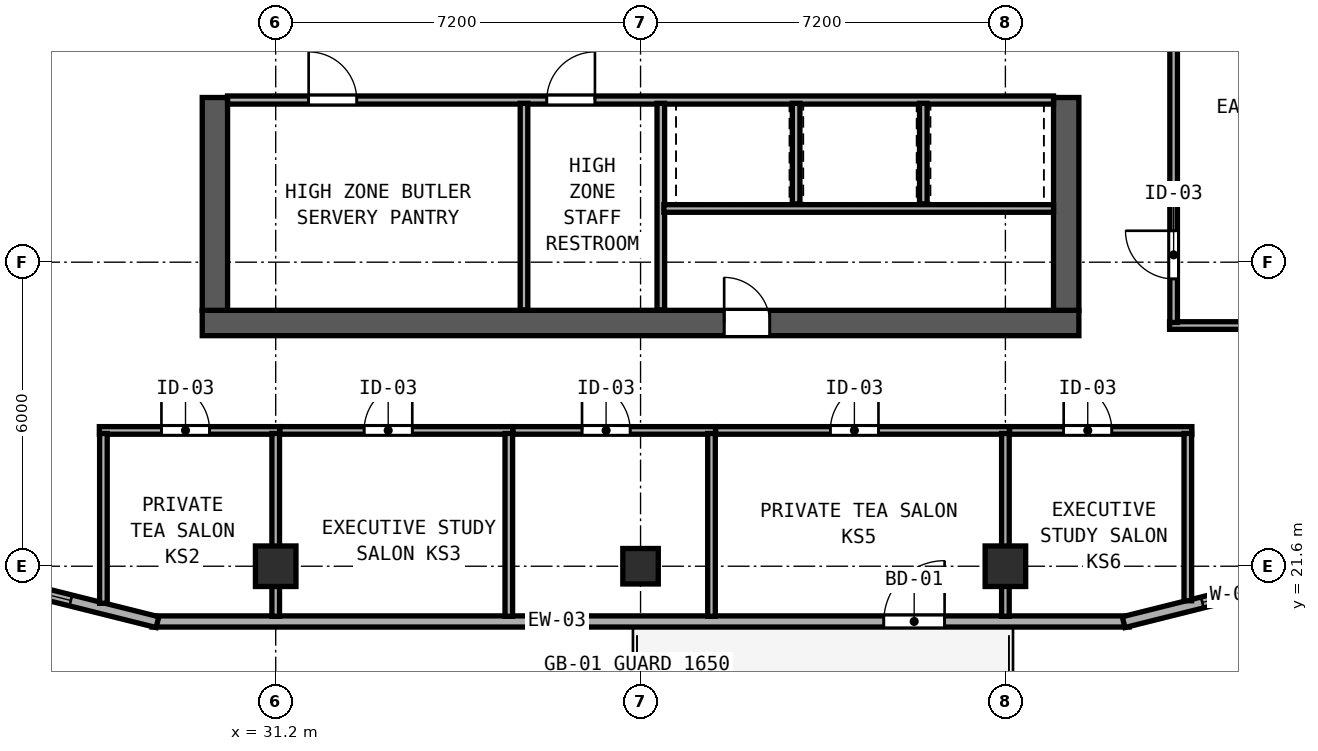
"""IFC4 building model, lengths in metres.
Left out: names, types, materials, properties, quantities, classifications, styles, units other than length and angle.
Written with IfcOpenShell. Run it as: python <this file> out.ifc"""

import sys

from ifc_helpers import new_model, si_unit, direction, frame, frame_2d, origin, origin_2d, place, context, subcontext, project, spatial, rectangle, hollow_rectangle, extrude, element, fill, save


model = new_model("IFC4")
c1 = context("Model", 3, precision=1e-05, world=origin(), true_north=direction((0.0, 1.0)))
c2 = subcontext(c1, "Body", "Model", "MODEL_VIEW")
j1 = project(units=[si_unit("LENGTHUNIT", "METRE"), si_unit("PLANEANGLEUNIT", "RADIAN")], contexts=[c1])
p1 = place(None, origin())
s1 = spatial("IfcSite", under=j1, at=p1, CompositionType="ELEMENT")
p2 = place(p1, origin())
s2 = spatial("IfcBuilding", under=s1, at=p2, CompositionType="ELEMENT")
p3 = place(p2, frame((0.0, 0.0, 258.3)))
s3 = spatial("IfcBuildingStorey", under=s2, at=p3, CompositionType="ELEMENT", Elevation=258.3)
p4 = place(p3, frame((29.75, 26.4, 0.0), z_axis=(0.0, 0.0, 1.0), x_axis=(1.0, 0.0, 0.0)))
e1 = element("IfcWall", 1, at=p4, inside=s3, PredefinedType="SHEAR", context=c2, shape_type="SweptSolid", body=[
    extrude(rectangle(XDim=17.3, YDim=0.5, at=frame_2d((8.65, 0.0))), origin(), (0.0, 0.0, 1.0), 3.67),
])
p5 = place(p4, frame((11.2, 0.0, 0.0), z_axis=(0.0, 0.0, 1.0), x_axis=(-1.0, 0.0, 0.0)))
e2 = element("IfcOpeningElement", 2, at=p5, cuts=e1, PredefinedType="OPENING", context=c2, shape_type="SweptSolid", body=[
    extrude(rectangle(XDim=0.9, YDim=2.1, at=frame_2d((0.45, 1.05))), frame((0.0, 0.26, 0.0), z_axis=(0.0, -1.0, 0.0), x_axis=(1.0, 0.0, 0.0)), (0.0, 0.0, 1.0), 0.52),
])
for number, where, z_axis, x_axis in (
    (3, (30.0, 26.65, 0.0), (0.0, 0.0, 1.0), (0.0, 1.0, 0.0)),
    (4, (46.8, 26.65, 0.0), (0.0, 0.0, 1.0), (0.0, 1.0, 0.0)),
):
    element("IfcWall", number, at=place(p3, frame(where, z_axis=z_axis, x_axis=x_axis)), inside=s3, PredefinedType="SHEAR", context=c2, shape_type="SweptSolid", body=[
        extrude(rectangle(XDim=4.2, YDim=0.5, at=frame_2d((2.1, 0.0))), origin(), (0.0, 0.0, 1.0), 3.67),
    ])
for number, where, z_axis, x_axis in (
    (5, (31.2, 21.6, 0.0), (0.0, 0.0, 1.0), (1.0, 0.0, 0.0)),
    (6, (45.6, 21.6, 0.0), (0.0, 0.0, 1.0), (1.0, 0.0, 0.0)),
):
    element("IfcColumn", number, at=place(p3, frame(where, z_axis=z_axis, x_axis=x_axis)), inside=s3, PredefinedType="COLUMN", context=c2, shape_type="SweptSolid", body=[
        extrude(hollow_rectangle(XDim=0.8, YDim=0.8, WallThickness=0.03, at=origin_2d()), origin(), (0.0, 0.0, 1.0), 3.85),
    ])
p6 = place(p3, frame((38.4, 21.6, 0.0), z_axis=(0.0, 0.0, 1.0), x_axis=(1.0, 0.0, 0.0)))
e7 = element("IfcColumn", 7, at=p6, inside=s3, PredefinedType="COLUMN", context=c2, shape_type="SweptSolid", body=[
    extrude(hollow_rectangle(XDim=0.7, YDim=0.7, WallThickness=0.026, at=origin_2d()), origin(), (0.0, 0.0, 1.0), 3.85),
])
p7 = place(p3, frame((28.759, 20.51, 0.0), z_axis=(0.0, 0.0, 1.0), x_axis=(1.0, 0.0, 0.0)))
e8 = element("IfcWall", 8, at=p7, inside=s3, PredefinedType="SOLIDWALL", context=c2, shape_type="SweptSolid", body=[
    extrude(rectangle(XDim=19.283, YDim=0.22, at=frame_2d((9.642, 0.0))), origin(), (0.0, 0.0, 1.0), 3.67),
])
p8 = place(p7, frame((15.641, 0.0, 0.0), z_axis=(0.0, 0.0, 1.0), x_axis=(-1.0, 0.0, 0.0)))
e9 = element("IfcOpeningElement", 9, at=p8, cuts=e8, PredefinedType="OPENING", context=c2, shape_type="SweptSolid", body=[
    extrude(rectangle(XDim=1.2, YDim=2.15, at=frame_2d((0.6, 1.075))), frame((0.0, 0.12, 0.0), z_axis=(0.0, -1.0, 0.0), x_axis=(1.0, 0.0, 0.0)), (0.0, 0.0, 1.0), 0.24),
])
p9 = place(p3, frame((47.933, 20.497, 0.0), z_axis=(0.0, 0.0, 1.0), x_axis=(0.970133159038, 0.242572986408, 0.0)))
e10 = element("IfcWall", 10, at=p9, inside=s3, PredefinedType="SOLIDWALL", context=c2, shape_type="SweptSolid", body=[
    extrude(rectangle(XDim=4.613, YDim=0.22, at=frame_2d((2.306, 0.0))), origin(), (0.0, 0.0, 1.0), 3.315),
])
p10 = place(p9, frame((1.6, 0.0, 0.85)))
e11 = element("IfcOpeningElement", 11, at=p10, cuts=e10, PredefinedType="OPENING", context=c2, shape_type="SweptSolid", body=[
    extrude(rectangle(XDim=1.25, YDim=1.95, at=frame_2d((0.625, 0.975))), frame((0.0, 0.12, 0.0), z_axis=(0.0, -1.0, 0.0), x_axis=(1.0, 0.0, 0.0)), (0.0, 0.0, 1.0), 0.24),
])
p11 = place(p3, frame((24.392, 21.615, 0.0), z_axis=(0.0, 0.0, 1.0), x_axis=(0.970133159038, -0.242572986408, 0.0)))
e12 = element("IfcWall", 12, at=p11, inside=s3, PredefinedType="SOLIDWALL", context=c2, shape_type="SweptSolid", body=[
    extrude(rectangle(XDim=4.613, YDim=0.22, at=frame_2d((2.306, 0.0))), origin(), (0.0, 0.0, 1.0), 3.315),
])
p12 = place(p11, frame((1.6, 0.0, 0.85)))
e13 = element("IfcOpeningElement", 13, at=p12, cuts=e12, PredefinedType="OPENING", context=c2, shape_type="SweptSolid", body=[
    extrude(rectangle(XDim=1.25, YDim=1.95, at=frame_2d((0.625, 0.975))), frame((0.0, 0.12, 0.0), z_axis=(0.0, -1.0, 0.0), x_axis=(1.0, 0.0, 0.0)), (0.0, 0.0, 1.0), 0.24),
])
p13 = place(p3, frame((30.25, 30.8, 0.0), z_axis=(0.0, 0.0, 1.0), x_axis=(1.0, 0.0, 0.0)))
e14 = element("IfcWall", 14, at=p13, inside=s3, PredefinedType="SOLIDWALL", context=c2, shape_type="SweptSolid", body=[
    extrude(rectangle(XDim=16.3, YDim=0.16, at=frame_2d((8.15, 0.0))), origin(), (0.0, 0.0, 1.0), 3.67),
])
p14 = place(p13, frame((1.6, 0.0, 0.0)))
e15 = element("IfcOpeningElement", 15, at=p14, cuts=e14, PredefinedType="OPENING", context=c2, shape_type="SweptSolid", body=[
    extrude(rectangle(XDim=0.95, YDim=2.12, at=frame_2d((0.475, 1.06))), frame((0.0, 0.09, 0.0), z_axis=(0.0, -1.0, 0.0), x_axis=(1.0, 0.0, 0.0)), (0.0, 0.0, 1.0), 0.18),
])
p15 = place(p13, frame((6.3, 0.0, 0.0)))
e16 = element("IfcOpeningElement", 16, at=p15, cuts=e14, PredefinedType="OPENING", context=c2, shape_type="SweptSolid", body=[
    extrude(rectangle(XDim=0.95, YDim=2.12, at=frame_2d((0.475, 1.06))), frame((0.0, 0.09, 0.0), z_axis=(0.0, -1.0, 0.0), x_axis=(1.0, 0.0, 0.0)), (0.0, 0.0, 1.0), 0.18),
])
p16 = place(p3, frame((38.8, 26.66, 0.0), z_axis=(0.0, 0.0, 1.0), x_axis=(0.0, 1.0, 0.0)))
e17 = element("IfcWall", 17, at=p16, inside=s3, PredefinedType="SOLIDWALL", context=c2, shape_type="SweptSolid", body=[
    extrude(rectangle(XDim=4.075, YDim=0.15, at=frame_2d((2.038, 0.0))), origin(), (0.0, 0.0, 1.0), 3.67),
])
p17 = place(p3, frame((36.1, 26.66, 0.0), z_axis=(0.0, 0.0, 1.0), x_axis=(0.0, 1.0, 0.0)))
e18 = element("IfcWall", 18, at=p17, inside=s3, PredefinedType="PARTITIONING", context=c2, shape_type="SweptSolid", body=[
    extrude(rectangle(XDim=4.075, YDim=0.15, at=frame_2d((2.038, 0.0))), origin(), (0.0, 0.0, 1.0), 3.67),
])
p18 = place(p3, frame((38.86, 28.66, 0.0), z_axis=(0.0, 0.0, 1.0), x_axis=(1.0, 0.0, 0.0)))
e19 = element("IfcWall", 19, at=p18, inside=s3, PredefinedType="PARTITIONING", context=c2, shape_type="SweptSolid", body=[
    extrude(rectangle(XDim=7.69, YDim=0.15, at=frame_2d((3.845, 0.0))), origin(), (0.0, 0.0, 1.0), 3.67),
])
for number, where, z_axis, x_axis in (
    (20, (41.47, 28.75, 0.0), (0.0, 0.0, 1.0), (0.0, 1.0, 0.0)),
    (21, (43.98, 28.75, 0.0), (0.0, 0.0, 1.0), (0.0, 1.0, 0.0)),
):
    element("IfcWall", number, at=place(p3, frame(where, z_axis=z_axis, x_axis=x_axis)), inside=s3, PredefinedType="SOLIDWALL", context=c2, shape_type="SweptSolid", body=[
        extrude(rectangle(XDim=1.985, YDim=0.15, at=frame_2d((0.993, 0.0))), origin(), (0.0, 0.0, 1.0), 3.67),
    ])
p19 = place(p3, frame((48.84, 26.35, 0.0), z_axis=(0.0, 0.0, 1.0), x_axis=(1.0, 0.0, 0.0)))
e22 = element("IfcWall", 22, at=p19, inside=s3, PredefinedType="PARTITIONING", context=c2, shape_type="SweptSolid", body=[
    extrude(rectangle(XDim=3.748, YDim=0.15, at=frame_2d((1.874, 0.0))), origin(), (0.0, 0.0, 1.0), 3.67),
])
p20 = place(p3, frame((48.92, 26.41, 0.0), z_axis=(0.0, 0.0, 1.0), x_axis=(0.0, 1.0, 0.0)))
e23 = element("IfcWall", 23, at=p20, inside=s3, PredefinedType="PARTITIONING", context=c2, shape_type="SweptSolid", body=[
    extrude(rectangle(XDim=6.37, YDim=0.15, at=frame_2d((3.185, 0.0))), origin(), (0.0, 0.0, 1.0), 3.67),
])
p21 = place(p20, frame((0.86, 0.0, 0.0)))
e24 = element("IfcOpeningElement", 24, at=p21, cuts=e23, PredefinedType="OPENING", context=c2, shape_type="SweptSolid", body=[
    extrude(rectangle(XDim=0.95, YDim=2.12, at=frame_2d((0.475, 1.06))), frame((0.0, 0.085, 0.0), z_axis=(0.0, -1.0, 0.0), x_axis=(1.0, 0.0, 0.0)), (0.0, 0.0, 1.0), 0.17),
])
p22 = place(p3, frame((27.72, 24.28, 0.0), z_axis=(0.0, 0.0, 1.0), x_axis=(1.0, 0.0, 0.0)))
e25 = element("IfcWall", 25, at=p22, inside=s3, PredefinedType="PARTITIONING", context=c2, shape_type="SweptSolid", body=[
    extrude(rectangle(XDim=3.56, YDim=0.15, at=frame_2d((1.78, 0.0))), origin(), (0.0, 0.0, 1.0), 3.67),
])
p23 = place(p22, frame((2.175, 0.0, 0.0), z_axis=(0.0, 0.0, 1.0), x_axis=(-1.0, 0.0, 0.0)))
e26 = element("IfcOpeningElement", 26, at=p23, cuts=e25, PredefinedType="OPENING", context=c2, shape_type="SweptSolid", body=[
    extrude(rectangle(XDim=0.95, YDim=2.12, at=frame_2d((0.475, 1.06))), frame((0.0, 0.085, 0.0), z_axis=(0.0, -1.0, 0.0), x_axis=(1.0, 0.0, 0.0)), (0.0, 0.0, 1.0), 0.17),
])
p24 = place(p3, frame((27.8, 20.868, 0.0), z_axis=(0.0, 0.0, 1.0), x_axis=(0.0, 1.0, 0.0)))
e27 = element("IfcWall", 27, at=p24, inside=s3, PredefinedType="PARTITIONING", context=c2, shape_type="SweptSolid", body=[
    extrude(rectangle(XDim=3.352, YDim=0.15, at=frame_2d((1.676, 0.0))), origin(), (0.0, 0.0, 1.0), 3.67),
])
p25 = place(p3, frame((31.2, 20.612, 0.0), z_axis=(0.0, 0.0, 1.0), x_axis=(0.0, 1.0, 0.0)))
e28 = element("IfcWall", 28, at=p25, inside=s3, PredefinedType="PARTITIONING", context=c2, shape_type="SweptSolid", body=[
    extrude(rectangle(XDim=3.608, YDim=0.15, at=frame_2d((1.804, 0.0))), origin(), (0.0, 0.0, 1.0), 3.155),
])
p26 = place(p3, frame((31.282, 24.28, 0.0), z_axis=(0.0, 0.0, 1.0), x_axis=(1.0, 0.0, 0.0)))
e29 = element("IfcWall", 29, at=p26, inside=s3, PredefinedType="PARTITIONING", context=c2, shape_type="SweptSolid", body=[
    extrude(rectangle(XDim=4.598, YDim=0.15, at=frame_2d((2.299, 0.0))), origin(), (0.0, 0.0, 1.0), 3.67),
])
p27 = place(p26, frame((2.613, 0.0, 0.0), z_axis=(0.0, 0.0, 1.0), x_axis=(-1.0, 0.0, 0.0)))
e30 = element("IfcOpeningElement", 30, at=p27, cuts=e29, PredefinedType="OPENING", context=c2, shape_type="SweptSolid", body=[
    extrude(rectangle(XDim=0.95, YDim=2.12, at=frame_2d((0.475, 1.06))), frame((0.0, 0.085, 0.0), z_axis=(0.0, -1.0, 0.0), x_axis=(1.0, 0.0, 0.0)), (0.0, 0.0, 1.0), 0.17),
])
p28 = place(p3, frame((35.8, 20.612, 0.0), z_axis=(0.0, 0.0, 1.0), x_axis=(0.0, 1.0, 0.0)))
e31 = element("IfcWall", 31, at=p28, inside=s3, PredefinedType="PARTITIONING", context=c2, shape_type="SweptSolid", body=[
    extrude(rectangle(XDim=3.608, YDim=0.15, at=frame_2d((1.804, 0.0))), origin(), (0.0, 0.0, 1.0), 3.67),
])
p29 = place(p3, frame((35.882, 24.28, 0.0), z_axis=(0.0, 0.0, 1.0), x_axis=(1.0, 0.0, 0.0)))
e32 = element("IfcWall", 32, at=p29, inside=s3, PredefinedType="PARTITIONING", context=c2, shape_type="SweptSolid", body=[
    extrude(rectangle(XDim=3.998, YDim=0.15, at=frame_2d((1.999, 0.0))), origin(), (0.0, 0.0, 1.0), 3.67),
])
p30 = place(p29, frame((2.313, 0.0, 0.0), z_axis=(0.0, 0.0, 1.0), x_axis=(-1.0, 0.0, 0.0)))
e33 = element("IfcOpeningElement", 33, at=p30, cuts=e32, PredefinedType="OPENING", context=c2, shape_type="SweptSolid", body=[
    extrude(rectangle(XDim=0.95, YDim=2.12, at=frame_2d((0.475, 1.06))), frame((0.0, 0.085, 0.0), z_axis=(0.0, -1.0, 0.0), x_axis=(1.0, 0.0, 0.0)), (0.0, 0.0, 1.0), 0.17),
])
p31 = place(p3, frame((39.8, 20.612, 0.0), z_axis=(0.0, 0.0, 1.0), x_axis=(0.0, 1.0, 0.0)))
e34 = element("IfcWall", 34, at=p31, inside=s3, PredefinedType="PARTITIONING", context=c2, shape_type="SweptSolid", body=[
    extrude(rectangle(XDim=3.608, YDim=0.15, at=frame_2d((1.804, 0.0))), origin(), (0.0, 0.0, 1.0), 3.67),
])
p32 = place(p3, frame((39.882, 24.28, 0.0), z_axis=(0.0, 0.0, 1.0), x_axis=(1.0, 0.0, 0.0)))
e35 = element("IfcWall", 35, at=p32, inside=s3, PredefinedType="PARTITIONING", context=c2, shape_type="SweptSolid", body=[
    extrude(rectangle(XDim=5.798, YDim=0.15, at=frame_2d((2.899, 0.0))), origin(), (0.0, 0.0, 1.0), 3.67),
])
p33 = place(p32, frame((3.213, 0.0, 0.0), z_axis=(0.0, 0.0, 1.0), x_axis=(-1.0, 0.0, 0.0)))
e36 = element("IfcOpeningElement", 36, at=p33, cuts=e35, PredefinedType="OPENING", context=c2, shape_type="SweptSolid", body=[
    extrude(rectangle(XDim=0.95, YDim=2.12, at=frame_2d((0.475, 1.06))), frame((0.0, 0.085, 0.0), z_axis=(0.0, -1.0, 0.0), x_axis=(1.0, 0.0, 0.0)), (0.0, 0.0, 1.0), 0.17),
])
p34 = place(p3, frame((45.6, 20.612, 0.0), z_axis=(0.0, 0.0, 1.0), x_axis=(0.0, 1.0, 0.0)))
e37 = element("IfcWall", 37, at=p34, inside=s3, PredefinedType="PARTITIONING", context=c2, shape_type="SweptSolid", body=[
    extrude(rectangle(XDim=3.608, YDim=0.15, at=frame_2d((1.804, 0.0))), origin(), (0.0, 0.0, 1.0), 3.155),
])
p35 = place(p3, frame((45.682, 24.28, 0.0), z_axis=(0.0, 0.0, 1.0), x_axis=(1.0, 0.0, 0.0)))
e38 = element("IfcWall", 38, at=p35, inside=s3, PredefinedType="PARTITIONING", context=c2, shape_type="SweptSolid", body=[
    extrude(rectangle(XDim=3.598, YDim=0.15, at=frame_2d((1.799, 0.0))), origin(), (0.0, 0.0, 1.0), 3.67),
])
p36 = place(p35, frame((2.018, 0.0, 0.0), z_axis=(0.0, 0.0, 1.0), x_axis=(-1.0, 0.0, 0.0)))
e39 = element("IfcOpeningElement", 39, at=p36, cuts=e38, PredefinedType="OPENING", context=c2, shape_type="SweptSolid", body=[
    extrude(rectangle(XDim=0.95, YDim=2.12, at=frame_2d((0.475, 1.06))), frame((0.0, 0.085, 0.0), z_axis=(0.0, -1.0, 0.0), x_axis=(1.0, 0.0, 0.0)), (0.0, 0.0, 1.0), 0.17),
])
p37 = place(p3, frame((49.2, 20.918, 0.0), z_axis=(0.0, 0.0, 1.0), x_axis=(0.0, 1.0, 0.0)))
e40 = element("IfcWall", 40, at=p37, inside=s3, PredefinedType="PARTITIONING", context=c2, shape_type="SweptSolid", body=[
    extrude(rectangle(XDim=3.302, YDim=0.15, at=frame_2d((1.651, 0.0))), origin(), (0.0, 0.0, 1.0), 3.67),
])
p38 = place(p10, origin())
e41 = element("IfcWindow", 41, at=p38, inside=s3, PartitioningType="SINGLE_PANEL", PredefinedType="WINDOW", context=c2, shape_type="SweptSolid", body=[
    extrude(rectangle(XDim=1.25, YDim=1.95, at=frame_2d((0.625, 0.975))), frame((0.0, 0.03, 0.0), z_axis=(0.0, -1.0, 0.0), x_axis=(1.0, 0.0, 0.0)), (0.0, 0.0, 1.0), 0.06),
])
fill(e11, e41)
p39 = place(p12, origin())
e42 = element("IfcWindow", 42, at=p39, inside=s3, PartitioningType="SINGLE_PANEL", PredefinedType="WINDOW", context=c2, shape_type="SweptSolid", body=[
    extrude(rectangle(XDim=1.25, YDim=1.95, at=frame_2d((0.625, 0.975))), frame((0.0, 0.03, 0.0), z_axis=(0.0, -1.0, 0.0), x_axis=(1.0, 0.0, 0.0)), (0.0, 0.0, 1.0), 0.06),
])
fill(e13, e42)
p40 = place(p8, origin())
e43 = element("IfcDoor", 43, at=p40, inside=s3, OperationType="SINGLE_SWING_LEFT", PredefinedType="DOOR", context=c2, shape_type="SweptSolid", body=[
    extrude(rectangle(XDim=1.2, YDim=2.15, at=frame_2d((0.6, 1.075))), frame((0.0, 0.025, 0.0), z_axis=(0.0, -1.0, 0.0), x_axis=(1.0, 0.0, 0.0)), (0.0, 0.0, 1.0), 0.05),
])
fill(e9, e43)
p41 = place(p14, origin())
e44 = element("IfcDoor", 44, at=p41, inside=s3, OperationType="SINGLE_SWING_LEFT", PredefinedType="DOOR", context=c2, shape_type="SweptSolid", body=[
    extrude(rectangle(XDim=0.95, YDim=2.12, at=frame_2d((0.475, 1.06))), frame((0.0, 0.025, 0.0), z_axis=(0.0, -1.0, 0.0), x_axis=(1.0, 0.0, 0.0)), (0.0, 0.0, 1.0), 0.05),
])
fill(e15, e44)
p42 = place(p15, origin())
e45 = element("IfcDoor", 45, at=p42, inside=s3, OperationType="SINGLE_SWING_RIGHT", PredefinedType="DOOR", context=c2, shape_type="SweptSolid", body=[
    extrude(rectangle(XDim=0.95, YDim=2.12, at=frame_2d((0.475, 1.06))), frame((0.0, 0.025, 0.0), z_axis=(0.0, -1.0, 0.0), x_axis=(1.0, 0.0, 0.0)), (0.0, 0.0, 1.0), 0.05),
])
fill(e16, e45)
p43 = place(p5, origin())
e46 = element("IfcDoor", 46, at=p43, inside=s3, OperationType="SINGLE_SWING_RIGHT", PredefinedType="DOOR", context=c2, shape_type="SweptSolid", body=[
    extrude(rectangle(XDim=0.9, YDim=2.1, at=frame_2d((0.45, 1.05))), frame((0.0, -0.195, 0.0), z_axis=(0.0, -1.0, 0.0), x_axis=(1.0, 0.0, 0.0)), (0.0, 0.0, 1.0), 0.05),
])
fill(e2, e46)
p44 = place(p21, origin())
e47 = element("IfcDoor", 47, at=p44, inside=s3, OperationType="SINGLE_SWING_RIGHT", PredefinedType="DOOR", context=c2, shape_type="SweptSolid", body=[
    extrude(rectangle(XDim=0.95, YDim=2.12, at=frame_2d((0.475, 1.06))), frame((0.0, 0.025, 0.0), z_axis=(0.0, -1.0, 0.0), x_axis=(1.0, 0.0, 0.0)), (0.0, 0.0, 1.0), 0.05),
])
fill(e24, e47)
p45 = place(p23, origin())
e48 = element("IfcDoor", 48, at=p45, inside=s3, OperationType="SINGLE_SWING_RIGHT", PredefinedType="DOOR", context=c2, shape_type="SweptSolid", body=[
    extrude(rectangle(XDim=0.95, YDim=2.12, at=frame_2d((0.475, 1.06))), frame((0.0, 0.025, 0.0), z_axis=(0.0, -1.0, 0.0), x_axis=(1.0, 0.0, 0.0)), (0.0, 0.0, 1.0), 0.05),
])
fill(e26, e48)
p46 = place(p27, origin())
e49 = element("IfcDoor", 49, at=p46, inside=s3, OperationType="SINGLE_SWING_LEFT", PredefinedType="DOOR", context=c2, shape_type="SweptSolid", body=[
    extrude(rectangle(XDim=0.95, YDim=2.12, at=frame_2d((0.475, 1.06))), frame((0.0, 0.025, 0.0), z_axis=(0.0, -1.0, 0.0), x_axis=(1.0, 0.0, 0.0)), (0.0, 0.0, 1.0), 0.05),
])
fill(e30, e49)
p47 = place(p30, origin())
e50 = element("IfcDoor", 50, at=p47, inside=s3, OperationType="SINGLE_SWING_RIGHT", PredefinedType="DOOR", context=c2, shape_type="SweptSolid", body=[
    extrude(rectangle(XDim=0.95, YDim=2.12, at=frame_2d((0.475, 1.06))), frame((0.0, 0.025, 0.0), z_axis=(0.0, -1.0, 0.0), x_axis=(1.0, 0.0, 0.0)), (0.0, 0.0, 1.0), 0.05),
])
fill(e33, e50)
p48 = place(p33, origin())
e51 = element("IfcDoor", 51, at=p48, inside=s3, OperationType="SINGLE_SWING_LEFT", PredefinedType="DOOR", context=c2, shape_type="SweptSolid", body=[
    extrude(rectangle(XDim=0.95, YDim=2.12, at=frame_2d((0.475, 1.06))), frame((0.0, 0.025, 0.0), z_axis=(0.0, -1.0, 0.0), x_axis=(1.0, 0.0, 0.0)), (0.0, 0.0, 1.0), 0.05),
])
fill(e36, e51)
p49 = place(p36, origin())
e52 = element("IfcDoor", 52, at=p49, inside=s3, OperationType="SINGLE_SWING_RIGHT", PredefinedType="DOOR", context=c2, shape_type="SweptSolid", body=[
    extrude(rectangle(XDim=0.95, YDim=2.12, at=frame_2d((0.475, 1.06))), frame((0.0, 0.025, 0.0), z_axis=(0.0, -1.0, 0.0), x_axis=(1.0, 0.0, 0.0)), (0.0, 0.0, 1.0), 0.05),
])
fill(e39, e52)
save(model, sys.argv[1])
